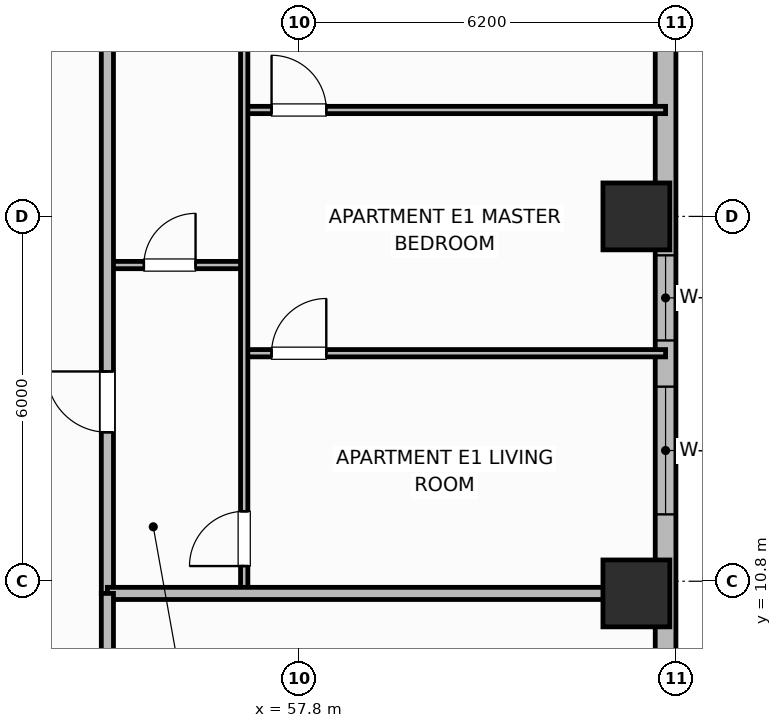
"""IFC4 building model, lengths in metres.
Left out: names, types, materials, properties, quantities, classifications, styles, units other than length and angle.
Written with IfcOpenShell. Run it as: python <this file> out.ifc"""

import sys

from ifc_helpers import new_model, si_unit, direction, frame, frame_2d, origin, origin_2d, place, context, subcontext, project, spatial, rectangle, extrude, element, fill, save


model = new_model("IFC4")
c1 = context("Model", 3, precision=1e-05, world=origin(), true_north=direction((0.0, 1.0)))
c2 = subcontext(c1, "Body", "Model", "MODEL_VIEW")
j1 = project(units=[si_unit("LENGTHUNIT", "METRE"), si_unit("PLANEANGLEUNIT", "RADIAN")], contexts=[c1])
p1 = place(None, origin())
s1 = spatial("IfcSite", under=j1, at=p1, CompositionType="ELEMENT")
p2 = place(p1, origin())
s2 = spatial("IfcBuilding", under=s1, at=p2, CompositionType="ELEMENT")
p3 = place(p2, frame((0.0, 0.0, 95.7)))
s3 = spatial("IfcBuildingStorey", under=s2, at=p3, CompositionType="ELEMENT", Elevation=95.7)
for number, where, z_axis, x_axis in (
    (1, (63.35, 10.6, 0.0), (0.0, 0.0, 1.0), (1.0, 0.0, 0.0)),
    (2, (63.35, 16.8, 0.0), (0.0, 0.0, 1.0), (1.0, 0.0, 0.0)),
):
    element("IfcColumn", number, at=place(p3, frame(where, z_axis=z_axis, x_axis=x_axis)), inside=s3, PredefinedType="COLUMN", context=c2, shape_type="SweptSolid", body=[
        extrude(rectangle(XDim=1.1, YDim=1.1, at=origin_2d()), origin(), (0.0, 0.0, 1.0), 3.7),
    ])
p4 = place(p3, frame((63.83, 9.0, 0.0), z_axis=(0.0, 0.0, 1.0), x_axis=(0.0, 1.0, 0.0)))
e3 = element("IfcWall", 3, at=p4, inside=s3, PredefinedType="SOLIDWALL", context=c2, shape_type="SweptSolid", body=[
    extrude(rectangle(XDim=14.8, YDim=0.34, at=frame_2d((7.4, 0.0))), origin(), (0.0, 0.0, 1.0), 2.7),
])
p5 = place(p4, frame((2.9, 0.0, 0.68)))
e4 = element("IfcOpeningElement", 4, at=p5, cuts=e3, PredefinedType="OPENING", context=c2, shape_type="SweptSolid", body=[
    extrude(rectangle(XDim=2.1, YDim=1.9, at=frame_2d((1.05, 0.95))), frame((0.0, 0.18, 0.0), z_axis=(0.0, -1.0, 0.0), x_axis=(1.0, 0.0, 0.0)), (0.0, 0.0, 1.0), 0.36),
])
p6 = place(p4, frame((5.76, 0.0, 0.69)))
e5 = element("IfcOpeningElement", 5, at=p6, cuts=e3, PredefinedType="OPENING", context=c2, shape_type="SweptSolid", body=[
    extrude(rectangle(XDim=1.4, YDim=1.85, at=frame_2d((0.7, 0.925))), frame((0.0, 0.18, 0.0), z_axis=(0.0, -1.0, 0.0), x_axis=(1.0, 0.0, 0.0)), (0.0, 0.0, 1.0), 0.36),
])
p7 = place(p4, frame((10.85, 0.0, 0.68)))
e6 = element("IfcOpeningElement", 6, at=p7, cuts=e3, PredefinedType="OPENING", context=c2, shape_type="SweptSolid", body=[
    extrude(rectangle(XDim=2.1, YDim=1.9, at=frame_2d((1.05, 0.95))), frame((0.0, 0.18, 0.0), z_axis=(0.0, -1.0, 0.0), x_axis=(1.0, 0.0, 0.0)), (0.0, 0.0, 1.0), 0.36),
])
p8 = place(p3, frame((54.65, 16.0, 0.0), z_axis=(0.0, 0.0, 1.0), x_axis=(1.0, 0.0, 0.0)))
e7 = element("IfcWall", 7, at=p8, inside=s3, PredefinedType="PARTITIONING", context=c2, shape_type="SweptSolid", body=[
    extrude(rectangle(XDim=2.25, YDim=0.12, at=frame_2d((1.125, 0.0))), origin(), (0.0, 0.0, 1.0), 2.53),
])
p9 = place(p8, frame((0.6, 0.0, 0.0)))
e8 = element("IfcOpeningElement", 8, at=p9, cuts=e7, PredefinedType="OPENING", context=c2, shape_type="SweptSolid", body=[
    extrude(rectangle(XDim=0.85, YDim=2.1, at=frame_2d((0.425, 1.05))), frame((0.0, 0.07, 0.0), z_axis=(0.0, -1.0, 0.0), x_axis=(1.0, 0.0, 0.0)), (0.0, 0.0, 1.0), 0.14),
])
p10 = place(p3, frame((56.9, 14.55, 0.0), z_axis=(0.0, 0.0, 1.0), x_axis=(1.0, 0.0, 0.0)))
e9 = element("IfcWall", 9, at=p10, inside=s3, PredefinedType="PARTITIONING", context=c2, shape_type="SweptSolid", body=[
    extrude(rectangle(XDim=6.93, YDim=0.12, at=frame_2d((3.465, 0.0))), origin(), (0.0, 0.0, 1.0), 2.53),
])
p11 = place(p10, frame((0.45, 0.0, 0.0)))
e10 = element("IfcOpeningElement", 10, at=p11, cuts=e9, PredefinedType="OPENING", context=c2, shape_type="SweptSolid", body=[
    extrude(rectangle(XDim=0.9, YDim=2.1, at=frame_2d((0.45, 1.05))), frame((0.0, 0.07, 0.0), z_axis=(0.0, -1.0, 0.0), x_axis=(1.0, 0.0, 0.0)), (0.0, 0.0, 1.0), 0.14),
])
p12 = place(p3, frame((56.9, 18.55, 0.0), z_axis=(0.0, 0.0, 1.0), x_axis=(1.0, 0.0, 0.0)))
e11 = element("IfcWall", 11, at=p12, inside=s3, PredefinedType="PARTITIONING", context=c2, shape_type="SweptSolid", body=[
    extrude(rectangle(XDim=6.93, YDim=0.12, at=frame_2d((3.465, 0.0))), origin(), (0.0, 0.0, 1.0), 2.53),
])
p13 = place(p12, frame((0.45, 0.0, 0.0)))
e12 = element("IfcOpeningElement", 12, at=p13, cuts=e11, PredefinedType="OPENING", context=c2, shape_type="SweptSolid", body=[
    extrude(rectangle(XDim=0.9, YDim=2.1, at=frame_2d((0.45, 1.05))), frame((0.0, 0.07, 0.0), z_axis=(0.0, -1.0, 0.0), x_axis=(1.0, 0.0, 0.0)), (0.0, 0.0, 1.0), 0.14),
])
p14 = place(p3, frame((56.9, 10.64, 0.0), z_axis=(0.0, 0.0, 1.0), x_axis=(0.0, 1.0, 0.0)))
e13 = element("IfcWall", 13, at=p14, inside=s3, PredefinedType="PARTITIONING", context=c2, shape_type="SweptSolid", body=[
    extrude(rectangle(XDim=15.92, YDim=0.12, at=frame_2d((7.96, 0.0))), origin(), (0.0, 0.0, 1.0), 2.53),
])
p15 = place(p14, frame((0.41, 0.0, 0.0)))
e14 = element("IfcOpeningElement", 14, at=p15, cuts=e13, PredefinedType="OPENING", context=c2, shape_type="SweptSolid", body=[
    extrude(rectangle(XDim=0.9, YDim=2.1, at=frame_2d((0.45, 1.05))), frame((0.0, 0.07, 0.0), z_axis=(0.0, -1.0, 0.0), x_axis=(1.0, 0.0, 0.0)), (0.0, 0.0, 1.0), 0.14),
])
p16 = place(p14, frame((13.125, 0.0, 0.0)))
e15 = element("IfcOpeningElement", 15, at=p16, cuts=e13, PredefinedType="OPENING", context=c2, shape_type="SweptSolid", body=[
    extrude(rectangle(XDim=0.82, YDim=2.08, at=frame_2d((0.41, 1.04))), frame((0.0, 0.07, 0.0), z_axis=(0.0, -1.0, 0.0), x_axis=(1.0, 0.0, 0.0)), (0.0, 0.0, 1.0), 0.14),
])
p17 = place(p3, frame((54.65, 10.6, 0.0), z_axis=(0.0, 0.0, 1.0), x_axis=(0.0, 1.0, 0.0)))
e16 = element("IfcWall", 16, at=p17, inside=s3, PredefinedType="PARTITIONING", context=c2, shape_type="SweptSolid", body=[
    extrude(rectangle(XDim=35.2, YDim=0.2, at=frame_2d((17.6, 0.0))), origin(), (0.0, 0.0, 1.0), 2.53),
])
p18 = place(p17, frame((2.65, 0.0, 0.0)))
e17 = element("IfcOpeningElement", 17, at=p18, cuts=e16, PredefinedType="OPENING", context=c2, shape_type="SweptSolid", body=[
    extrude(rectangle(XDim=1.0, YDim=2.15, at=frame_2d((0.5, 1.075))), frame((0.0, 0.11, 0.0), z_axis=(0.0, -1.0, 0.0), x_axis=(1.0, 0.0, 0.0)), (0.0, 0.0, 1.0), 0.22),
])
p19 = place(p17, frame((19.95, 0.0, 0.0)))
e18 = element("IfcOpeningElement", 18, at=p19, cuts=e16, PredefinedType="OPENING", context=c2, shape_type="SweptSolid", body=[
    extrude(rectangle(XDim=1.0, YDim=2.15, at=frame_2d((0.5, 1.075))), frame((0.0, 0.11, 0.0), z_axis=(0.0, -1.0, 0.0), x_axis=(1.0, 0.0, 0.0)), (0.0, 0.0, 1.0), 0.22),
])
p20 = place(p3, frame((54.65, 10.6, 0.0), z_axis=(0.0, 0.0, 1.0), x_axis=(1.0, 0.0, 0.0)))
e19 = element("IfcWall", 19, at=p20, inside=s3, PredefinedType="PARTITIONING", context=c2, shape_type="SweptSolid", body=[
    extrude(rectangle(XDim=8.76, YDim=0.2, at=frame_2d((4.38, 0.0))), origin(), (0.0, 0.0, 1.0), 2.53),
])
p21 = place(p3, frame((54.65, 4.97, 0.0), z_axis=(0.0, 0.0, 1.0), x_axis=(0.0, 1.0, 0.0)))
e20 = element("IfcWall", 20, at=p21, inside=s3, PredefinedType="PARTITIONING", context=c2, shape_type="SweptSolid", body=[
    extrude(rectangle(XDim=5.63, YDim=0.2, at=frame_2d((2.815, 0.0))), origin(), (0.0, 0.0, 1.0), 2.53),
])
p22 = place(p5, origin())
e21 = element("IfcWindow", 21, at=p22, inside=s3, PartitioningType="SINGLE_PANEL", PredefinedType="WINDOW", context=c2, shape_type="SweptSolid", body=[
    extrude(rectangle(XDim=2.1, YDim=1.9, at=frame_2d((1.05, 0.95))), frame((0.0, 0.03, 0.0), z_axis=(0.0, -1.0, 0.0), x_axis=(1.0, 0.0, 0.0)), (0.0, 0.0, 1.0), 0.06),
])
fill(e4, e21)
p23 = place(p6, origin())
e22 = element("IfcWindow", 22, at=p23, inside=s3, PartitioningType="SINGLE_PANEL", PredefinedType="WINDOW", context=c2, shape_type="SweptSolid", body=[
    extrude(rectangle(XDim=1.4, YDim=1.85, at=frame_2d((0.7, 0.925))), frame((0.0, 0.03, 0.0), z_axis=(0.0, -1.0, 0.0), x_axis=(1.0, 0.0, 0.0)), (0.0, 0.0, 1.0), 0.06),
])
fill(e5, e22)
p24 = place(p9, origin())
e23 = element("IfcDoor", 23, at=p24, inside=s3, OperationType="SINGLE_SWING_RIGHT", PredefinedType="DOOR", context=c2, shape_type="SweptSolid", body=[
    extrude(rectangle(XDim=0.85, YDim=2.1, at=frame_2d((0.425, 1.05))), frame((0.0, 0.025, 0.0), z_axis=(0.0, -1.0, 0.0), x_axis=(1.0, 0.0, 0.0)), (0.0, 0.0, 1.0), 0.05),
])
fill(e8, e23)
p25 = place(p11, origin())
e24 = element("IfcDoor", 24, at=p25, inside=s3, OperationType="SINGLE_SWING_RIGHT", PredefinedType="DOOR", context=c2, shape_type="SweptSolid", body=[
    extrude(rectangle(XDim=0.9, YDim=2.1, at=frame_2d((0.45, 1.05))), frame((0.0, 0.025, 0.0), z_axis=(0.0, -1.0, 0.0), x_axis=(1.0, 0.0, 0.0)), (0.0, 0.0, 1.0), 0.05),
])
fill(e10, e24)
p26 = place(p13, origin())
e25 = element("IfcDoor", 25, at=p26, inside=s3, OperationType="SINGLE_SWING_LEFT", PredefinedType="DOOR", context=c2, shape_type="SweptSolid", body=[
    extrude(rectangle(XDim=0.9, YDim=2.1, at=frame_2d((0.45, 1.05))), frame((0.0, 0.025, 0.0), z_axis=(0.0, -1.0, 0.0), x_axis=(1.0, 0.0, 0.0)), (0.0, 0.0, 1.0), 0.05),
])
fill(e12, e25)
p27 = place(p15, origin())
e26 = element("IfcDoor", 26, at=p27, inside=s3, OperationType="SINGLE_SWING_LEFT", PredefinedType="DOOR", context=c2, shape_type="SweptSolid", body=[
    extrude(rectangle(XDim=0.9, YDim=2.1, at=frame_2d((0.45, 1.05))), frame((0.0, 0.025, 0.0), z_axis=(0.0, -1.0, 0.0), x_axis=(1.0, 0.0, 0.0)), (0.0, 0.0, 1.0), 0.05),
])
fill(e14, e26)
p28 = place(p18, origin())
e27 = element("IfcDoor", 27, at=p28, inside=s3, OperationType="SINGLE_SWING_RIGHT", PredefinedType="DOOR", context=c2, shape_type="SweptSolid", body=[
    extrude(rectangle(XDim=1.0, YDim=2.15, at=frame_2d((0.5, 1.075))), frame((0.0, 0.025, 0.0), z_axis=(0.0, -1.0, 0.0), x_axis=(1.0, 0.0, 0.0)), (0.0, 0.0, 1.0), 0.05),
])
fill(e17, e27)
save(model, sys.argv[1])
